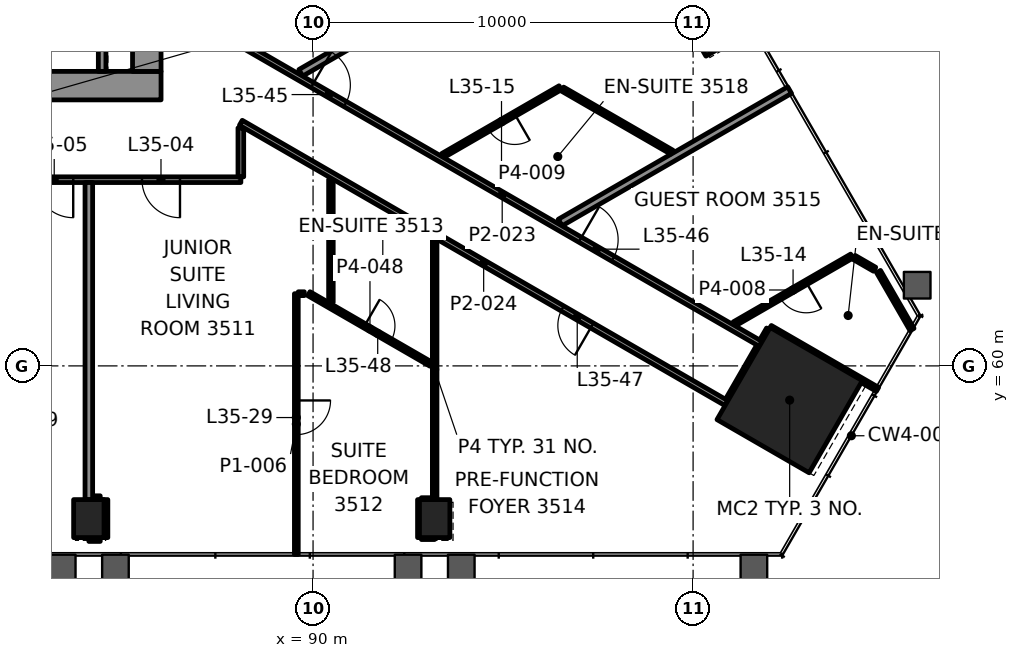
"""IFC4 building model, lengths in metres.
Left out: names, types, materials, properties, quantities, classifications, styles, units other than length and angle.
Written with IfcOpenShell. Run it as: python <this file> out.ifc"""

import sys

from ifc_helpers import new_model, si_unit, direction, frame, frame_2d, origin, origin_2d, place, context, subcontext, project, spatial, rectangle, hollow_rectangle, extrude, element, fill, save


model = new_model("IFC4")
c1 = context("Model", 3, precision=1e-05, world=origin(), true_north=direction((0.0, 1.0)))
c2 = subcontext(c1, "Body", "Model", "MODEL_VIEW")
j1 = project(units=[si_unit("LENGTHUNIT", "METRE"), si_unit("PLANEANGLEUNIT", "RADIAN")], contexts=[c1])
p1 = place(None, origin())
s1 = spatial("IfcSite", under=j1, at=p1, CompositionType="ELEMENT")
p2 = place(p1, origin())
s2 = spatial("IfcBuilding", under=s1, at=p2, CompositionType="ELEMENT")
p3 = place(p2, frame((0.0, 0.0, 155.8)))
s3 = spatial("IfcBuildingStorey", under=s2, at=p3, CompositionType="ELEMENT", Elevation=155.8)
p4 = place(p3, frame((102.541, 59.099, 0.0), z_axis=(0.0, 0.0, 1.0), x_axis=(0.5, 0.866025403784, 0.0)))
e1 = element("IfcColumn", 1, at=p4, inside=s3, PredefinedType="COLUMN", context=c2, shape_type="SweptSolid", body=[
    extrude(rectangle(XDim=2.8, YDim=2.8, at=origin_2d()), origin(), (0.0, 0.0, 1.0), 3.9),
])
for number, where, z_axis, x_axis in (
    (2, (84.1, 55.981, -0.0), (0.0, 0.0, 1.0), (1.0, 0.0, 0.0)),
    (3, (93.2, 55.981, -0.0), (0.0, 0.0, 1.0), (1.0, 0.0, 0.0)),
    (4, (100.571, 68.748, -0.0), (0.0, 0.0, 1.0), (-0.5, 0.866, 0.0)),
):
    element("IfcColumn", number, at=place(p3, frame(where, z_axis=z_axis, x_axis=x_axis)), inside=s3, PredefinedType="COLUMN", context=c2, shape_type="SweptSolid", body=[
        extrude(hollow_rectangle(XDim=0.8, YDim=1.0, WallThickness=0.05, at=origin_2d()), origin(), (0.0, 0.0, 1.0), 3.9),
    ])
p5 = place(p3, frame((64.0, 67.375, 0.0), z_axis=(0.0, 0.0, 1.0), x_axis=(1.0, 0.0, 0.0)))
e5 = element("IfcWall", 5, at=p5, inside=s3, PredefinedType="SHEAR", context=c2, shape_type="SweptSolid", body=[
    extrude(rectangle(XDim=22.0, YDim=0.75, at=frame_2d((11.0, 0.0))), origin(), (0.0, 0.0, 1.0), 3.7),
])
p6 = place(p5, frame((3.15, 0.0, 0.0)))
e6 = element("IfcOpeningElement", 6, at=p6, cuts=e5, PredefinedType="OPENING", context=c2, shape_type="SweptSolid", body=[
    extrude(rectangle(XDim=0.9, YDim=2.1, at=frame_2d((0.45, 1.05))), frame((0.0, 0.385, 0.0), z_axis=(0.0, -1.0, 0.0), x_axis=(1.0, 0.0, 0.0)), (0.0, 0.0, 1.0), 0.77),
])
p7 = place(p3, frame((85.625, 67.75, 0.0), z_axis=(0.0, 0.0, 1.0), x_axis=(0.0, 1.0, 0.0)))
e7 = element("IfcWall", 7, at=p7, inside=s3, PredefinedType="SHEAR", context=c2, shape_type="SweptSolid", body=[
    extrude(rectangle(XDim=14.5, YDim=0.75, at=frame_2d((7.25, 0.0))), origin(), (0.0, 0.0, 1.0), 3.7),
])
p8 = place(p7, frame((4.65, 0.0, 0.0)))
e8 = element("IfcOpeningElement", 8, at=p8, cuts=e7, PredefinedType="OPENING", context=c2, shape_type="SweptSolid", body=[
    extrude(rectangle(XDim=1.8, YDim=2.1, at=frame_2d((0.9, 1.05))), frame((0.0, 0.385, 0.0), z_axis=(0.0, -1.0, 0.0), x_axis=(1.0, 0.0, 0.0)), (0.0, 0.0, 1.0), 0.77),
])
p9 = place(p7, frame((11.8, 0.0, 0.0)))
e9 = element("IfcOpeningElement", 9, at=p9, cuts=e7, PredefinedType="OPENING", context=c2, shape_type="SweptSolid", body=[
    extrude(rectangle(XDim=0.9, YDim=2.1, at=frame_2d((0.45, 1.05))), frame((0.0, 0.385, 0.0), z_axis=(0.0, -1.0, 0.0), x_axis=(1.0, 0.0, 0.0)), (0.0, 0.0, 1.0), 0.77),
])
p10 = place(p3, frame((84.1, 55.481, 0.0), z_axis=(0.0, 0.0, 1.0), x_axis=(1.0, 0.0, 0.0)))
e10 = element("IfcWall", 10, at=p10, inside=s3, PredefinedType="PARTITIONING", context=c2, shape_type="SweptSolid", body=[
    extrude(rectangle(XDim=0.3, YDim=0.2, at=frame_2d((0.15, 0.0))), origin(), (0.0, 0.0, 1.0), 3.1),
])
p11 = place(p3, frame((92.851, 55.481, 0.0), z_axis=(0.0, 0.0, 1.0), x_axis=(1.0, 0.0, 0.0)))
e11 = element("IfcWall", 11, at=p11, inside=s3, PredefinedType="PARTITIONING", context=c2, shape_type="SweptSolid", body=[
    extrude(rectangle(XDim=0.349, YDim=0.1, at=frame_2d((0.174, 0.0))), origin(), (0.0, 0.0, 1.0), 3.1),
])
p12 = place(p3, frame((84.2, 56.481, 0.0), z_axis=(0.0, 0.0, 1.0), x_axis=(1.0, 0.0, 0.0)))
e12 = element("IfcWall", 12, at=p12, inside=s3, PredefinedType="PARTITIONING", context=c2, shape_type="SweptSolid", body=[
    extrude(rectangle(XDim=0.2, YDim=0.2, at=frame_2d((0.1, 0.0))), origin(), (0.0, 0.0, 1.0), 3.1),
])
p13 = place(p3, frame((92.851, 56.481, 0.0), z_axis=(0.0, 0.0, 1.0), x_axis=(1.0, 0.0, 0.0)))
e13 = element("IfcWall", 13, at=p13, inside=s3, PredefinedType="PARTITIONING", context=c2, shape_type="SweptSolid", body=[
    extrude(rectangle(XDim=0.289, YDim=0.1, at=frame_2d((0.145, 0.0))), origin(), (0.0, 0.0, 1.0), 3.1),
])
p14 = place(p3, frame((89.61, 61.9, 0.0), z_axis=(0.0, 0.0, 1.0), x_axis=(1.0, 0.0, 0.0)))
e14 = element("IfcWall", 14, at=p14, inside=s3, PredefinedType="PARTITIONING", context=c2, shape_type="SweptSolid", body=[
    extrude(rectangle(XDim=0.16, YDim=0.1, at=frame_2d((0.08, 0.0))), origin(), (0.0, 0.0, 1.0), 3.1),
])
p15 = place(p3, frame((88.1, 64.9, 0.0), z_axis=(0.0, 0.0, 1.0), x_axis=(-1.0, 0.0, 0.0)))
e15 = element("IfcWall", 15, at=p15, inside=s3, PredefinedType="PARTITIONING", context=c2, shape_type="SweptSolid", body=[
    extrude(rectangle(XDim=26.2, YDim=0.15, at=frame_2d((13.1, 0.0))), origin(), (0.0, 0.0, 1.0), 3.1),
])
p16 = place(p15, frame((1.602, 0.0, 0.0)))
e16 = element("IfcOpeningElement", 16, at=p16, cuts=e15, PredefinedType="OPENING", context=c2, shape_type="SweptSolid", body=[
    extrude(rectangle(XDim=1.0, YDim=2.1, at=frame_2d((0.5, 1.05))), frame((0.0, 0.085, 0.0), z_axis=(0.0, -1.0, 0.0), x_axis=(1.0, 0.0, 0.0)), (0.0, 0.0, 1.0), 0.17),
])
p17 = place(p15, frame((4.411, 0.0, 0.0)))
e17 = element("IfcOpeningElement", 17, at=p17, cuts=e15, PredefinedType="OPENING", context=c2, shape_type="SweptSolid", body=[
    extrude(rectangle(XDim=1.0, YDim=2.1, at=frame_2d((0.5, 1.05))), frame((0.0, 0.085, 0.0), z_axis=(0.0, -1.0, 0.0), x_axis=(1.0, 0.0, 0.0)), (0.0, 0.0, 1.0), 0.17),
])
p18 = place(p15, frame((12.081, 0.0, 0.0)))
e18 = element("IfcOpeningElement", 18, at=p18, cuts=e15, PredefinedType="OPENING", context=c2, shape_type="SweptSolid", body=[
    extrude(rectangle(XDim=0.9, YDim=2.1, at=frame_2d((0.45, 1.05))), frame((0.0, 0.085, 0.0), z_axis=(0.0, -1.0, 0.0), x_axis=(1.0, 0.0, 0.0)), (0.0, 0.0, 1.0), 0.17),
])
p19 = place(p15, frame((15.494, 0.0, 0.0)))
e19 = element("IfcOpeningElement", 19, at=p19, cuts=e15, PredefinedType="OPENING", context=c2, shape_type="SweptSolid", body=[
    extrude(rectangle(XDim=0.9, YDim=2.1, at=frame_2d((0.45, 1.05))), frame((0.0, 0.085, 0.0), z_axis=(0.0, -1.0, 0.0), x_axis=(1.0, 0.0, 0.0)), (0.0, 0.0, 1.0), 0.17),
])
p20 = place(p15, frame((17.873, 0.0, 0.0)))
e20 = element("IfcOpeningElement", 20, at=p20, cuts=e15, PredefinedType="OPENING", context=c2, shape_type="SweptSolid", body=[
    extrude(rectangle(XDim=1.0, YDim=2.1, at=frame_2d((0.5, 1.05))), frame((0.0, 0.085, 0.0), z_axis=(0.0, -1.0, 0.0), x_axis=(1.0, 0.0, 0.0)), (0.0, 0.0, 1.0), 0.17),
])
p21 = place(p15, frame((22.423, 0.0, 0.0)))
e21 = element("IfcOpeningElement", 21, at=p21, cuts=e15, PredefinedType="OPENING", context=c2, shape_type="SweptSolid", body=[
    extrude(rectangle(XDim=1.0, YDim=2.1, at=frame_2d((0.5, 1.05))), frame((0.0, 0.085, 0.0), z_axis=(0.0, -1.0, 0.0), x_axis=(1.0, 0.0, 0.0)), (0.0, 0.0, 1.0), 0.17),
])
p22 = place(p3, frame((104.176, 62.89, 0.0), z_axis=(0.0, 0.0, 1.0), x_axis=(-0.865998731726, -0.500046194516, 0.0)))
e22 = element("IfcWall", 22, at=p22, inside=s3, PredefinedType="PARTITIONING", context=c2, shape_type="SweptSolid", body=[
    extrude(rectangle(XDim=3.569, YDim=0.12, at=frame_2d((1.784, 0.0))), origin(), (0.0, 0.0, 1.0), 3.1),
])
p23 = place(p22, frame((1.384, 0.0, 0.0)))
e23 = element("IfcOpeningElement", 23, at=p23, cuts=e22, PredefinedType="OPENING", context=c2, shape_type="SweptSolid", body=[
    extrude(rectangle(XDim=0.8, YDim=2.1, at=frame_2d((0.4, 1.05))), frame((0.0, 0.07, 0.0), z_axis=(0.0, -1.0, 0.0), x_axis=(1.0, 0.0, 0.0)), (0.0, 0.0, 1.0), 0.14),
])
p24 = place(p3, frame((96.502, 63.772, 0.0), z_axis=(0.0, 0.0, 1.0), x_axis=(0.866014709899, 0.500018521895, 0.0)))
e24 = element("IfcWall", 24, at=p24, inside=s3, PredefinedType="PARTITIONING", context=c2, shape_type="SweptSolid", body=[
    extrude(rectangle(XDim=6.971, YDim=0.2, at=frame_2d((3.486, 0.0))), origin(), (0.0, 0.0, 1.0), 3.1),
])
p25 = place(p3, frame((96.504, 67.319, 0.0), z_axis=(0.0, 0.0, 1.0), x_axis=(-0.866028357664, -0.499994883695, 0.0)))
e25 = element("IfcWall", 25, at=p25, inside=s3, PredefinedType="PARTITIONING", context=c2, shape_type="SweptSolid", body=[
    extrude(rectangle(XDim=3.568, YDim=0.12, at=frame_2d((1.784, 0.0))), origin(), (0.0, 0.0, 1.0), 3.1),
])
p26 = place(p25, frame((1.384, 0.0, 0.0)))
e26 = element("IfcOpeningElement", 26, at=p26, cuts=e25, PredefinedType="OPENING", context=c2, shape_type="SweptSolid", body=[
    extrude(rectangle(XDim=0.8, YDim=2.1, at=frame_2d((0.4, 1.05))), frame((0.0, 0.07, 0.0), z_axis=(0.0, -1.0, 0.0), x_axis=(1.0, 0.0, 0.0)), (0.0, 0.0, 1.0), 0.14),
])
p27 = place(p3, frame((89.677, 67.712, 0.0), z_axis=(0.0, 0.0, 1.0), x_axis=(0.866020529357, 0.500008442661, 0.0)))
e27 = element("IfcWall", 27, at=p27, inside=s3, PredefinedType="PARTITIONING", context=c2, shape_type="SweptSolid", body=[
    extrude(rectangle(XDim=10.912, YDim=0.2, at=frame_2d((5.456, 0.0))), origin(), (0.0, 0.0, 1.0), 2.865),
])
p28 = place(p3, frame((100.917, 59.085, 0.0), z_axis=(0.0, 0.0, 1.0), x_axis=(0.499991515992, 0.866030301974, 0.0)))
e28 = element("IfcWall", 28, at=p28, inside=s3, PredefinedType="PARTITIONING", context=c2, shape_type="SweptSolid", body=[
    extrude(rectangle(XDim=1.649, YDim=0.15, at=frame_2d((0.825, 0.0))), origin(), (0.0, 0.0, 1.0), 2.947),
])
p29 = place(p3, frame((93.2, 56.482, 0.0), z_axis=(0.0, 0.0, 1.0), x_axis=(0.0, 1.0, 0.0)))
e29 = element("IfcWall", 29, at=p29, inside=s3, PredefinedType="PARTITIONING", context=c2, shape_type="SweptSolid", body=[
    extrude(rectangle(XDim=6.844, YDim=0.12, at=frame_2d((3.422, 0.0))), origin(), (0.0, 0.0, 1.0), 3.1),
])
p30 = place(p3, frame((92.8, 55.482, 0.0), z_axis=(0.0, 0.0, 1.0), x_axis=(0.0, 1.0, 0.0)))
e30 = element("IfcWall", 30, at=p30, inside=s3, PredefinedType="PARTITIONING", context=c2, shape_type="SweptSolid", body=[
    extrude(rectangle(XDim=0.999, YDim=0.1, at=frame_2d((0.5, 0.0))), origin(), (0.0, 0.0, 1.0), 2.865),
])
p31 = place(p3, frame((90.47, 61.674, 0.0), z_axis=(0.0, 0.0, 1.0), x_axis=(0.0, 1.0, 0.0)))
e31 = element("IfcWall", 31, at=p31, inside=s3, PredefinedType="PARTITIONING", context=c2, shape_type="SweptSolid", body=[
    extrude(rectangle(XDim=3.228, YDim=0.12, at=frame_2d((1.614, 0.0))), origin(), (0.0, 0.0, 1.0), 2.947),
])
p32 = place(p3, frame((89.56, 61.9, 0.0), z_axis=(0.0, 0.0, 1.0), x_axis=(0.0, -1.0, 0.0)))
e32 = element("IfcWall", 32, at=p32, inside=s3, PredefinedType="PARTITIONING", context=c2, shape_type="SweptSolid", body=[
    extrude(rectangle(XDim=6.862, YDim=0.1, at=frame_2d((3.431, 0.0))), origin(), (0.0, 0.0, 1.0), 2.865),
])
p33 = place(p32, frame((2.809, 0.0, 0.0)))
e33 = element("IfcOpeningElement", 33, at=p33, cuts=e32, PredefinedType="OPENING", context=c2, shape_type="SweptSolid", body=[
    extrude(rectangle(XDim=0.9, YDim=2.1, at=frame_2d((0.45, 1.05))), frame((0.0, 0.06, 0.0), z_axis=(0.0, -1.0, 0.0), x_axis=(1.0, 0.0, 0.0)), (0.0, 0.0, 1.0), 0.12),
])
p34 = place(p3, frame((88.1, 64.975, 0.0), z_axis=(0.0, 0.0, 1.0), x_axis=(0.0, 1.0, 0.0)))
e34 = element("IfcWall", 34, at=p34, inside=s3, PredefinedType="PARTITIONING", context=c2, shape_type="SweptSolid", body=[
    extrude(rectangle(XDim=1.286, YDim=0.15, at=frame_2d((0.643, 0.0))), origin(), (0.0, 0.0, 1.0), 2.947),
])
p35 = place(p3, frame((84.5, 55.481, 0.0), z_axis=(0.0, 0.0, 1.0), x_axis=(0.0, 1.0, 0.0)))
e35 = element("IfcWall", 35, at=p35, inside=s3, PredefinedType="PARTITIONING", context=c2, shape_type="SweptSolid", body=[
    extrude(rectangle(XDim=1.0, YDim=0.2, at=frame_2d((0.5, 0.0))), origin(), (0.0, 0.0, 1.0), 2.865),
])
p36 = place(p3, frame((84.1, 56.481, 0.0), z_axis=(0.0, 0.0, 1.0), x_axis=(0.0, 1.0, 0.0)))
e36 = element("IfcWall", 36, at=p36, inside=s3, PredefinedType="PARTITIONING", context=c2, shape_type="SweptSolid", body=[
    extrude(rectangle(XDim=8.344, YDim=0.2, at=frame_2d((4.172, 0.0))), origin(), (0.0, 0.0, 1.0), 3.1),
])
p37 = place(p3, frame((105.761, 60.956, 0.0), z_axis=(0.0, 0.0, 1.0), x_axis=(-0.500042189638, 0.866001044215, 0.0)))
e37 = element("IfcWall", 37, at=p37, inside=s3, PredefinedType="PARTITIONING", context=c2, shape_type="SweptSolid", body=[
    extrude(rectangle(XDim=1.762, YDim=0.12, at=frame_2d((0.881, 0.0))), origin(), (0.0, 0.0, 1.0), 3.1),
])
p38 = place(p3, frame((104.777, 62.543, 0.0), z_axis=(0.0, 0.0, 1.0), x_axis=(-0.866166054807, 0.499756306114, 0.0)))
e38 = element("IfcWall", 38, at=p38, inside=s3, PredefinedType="PARTITIONING", context=c2, shape_type="SweptSolid", body=[
    extrude(rectangle(XDim=0.624, YDim=0.12, at=frame_2d((0.312, 0.0))), origin(), (0.0, 0.0, 1.0), 3.1),
])
p39 = place(p3, frame((99.44, 65.624, 0.0), z_axis=(0.0, 0.0, 1.0), x_axis=(-0.866054626172, 0.499949381925, 0.0)))
e39 = element("IfcWall", 39, at=p39, inside=s3, PredefinedType="PARTITIONING", context=c2, shape_type="SweptSolid", body=[
    extrude(rectangle(XDim=3.322, YDim=0.12, at=frame_2d((1.661, 0.0))), origin(), (0.0, 0.0, 1.0), 3.1),
])
p40 = place(p3, frame((104.852, 59.382, 0.0), z_axis=(0.0, 0.0, 1.0), x_axis=(-0.866003472149, 0.500037984783, 0.0)))
e40 = element("IfcWall", 40, at=p40, inside=s3, PredefinedType="PARTITIONING", context=c2, shape_type="SweptSolid", body=[
    extrude(rectangle(XDim=3.26, YDim=0.12, at=frame_2d((1.63, 0.0))), origin(), (0.0, 0.0, 1.0), 3.1),
])
p41 = place(p3, frame((88.175, 68.433, 0.0), z_axis=(0.0, 0.0, 1.0), x_axis=(0.866028999927, -0.499993771247, 0.0)))
e41 = element("IfcWall", 41, at=p41, inside=s3, PredefinedType="PARTITIONING", context=c2, shape_type="SweptSolid", body=[
    extrude(rectangle(XDim=15.708, YDim=0.15, at=frame_2d((7.854, 0.0))), origin(), (0.0, 0.0, 1.0), 3.1),
])
p42 = place(p41, frame((2.086, 0.0, 0.0)))
e42 = element("IfcOpeningElement", 42, at=p42, cuts=e41, PredefinedType="OPENING", context=c2, shape_type="SweptSolid", body=[
    extrude(rectangle(XDim=1.0, YDim=2.1, at=frame_2d((0.5, 1.05))), frame((0.0, 0.085, 0.0), z_axis=(0.0, -1.0, 0.0), x_axis=(1.0, 0.0, 0.0)), (0.0, 0.0, 1.0), 0.17),
])
p43 = place(p41, frame((10.222, 0.0, 0.0)))
e43 = element("IfcOpeningElement", 43, at=p43, cuts=e41, PredefinedType="OPENING", context=c2, shape_type="SweptSolid", body=[
    extrude(rectangle(XDim=1.0, YDim=2.1, at=frame_2d((0.5, 1.05))), frame((0.0, 0.085, 0.0), z_axis=(0.0, -1.0, 0.0), x_axis=(1.0, 0.0, 0.0)), (0.0, 0.0, 1.0), 0.17),
])
p44 = place(p3, frame((100.878, 59.02, 0.0), z_axis=(0.0, 0.0, 1.0), x_axis=(-0.866029079904, 0.49999363272, 0.0)))
e44 = element("IfcWall", 44, at=p44, inside=s3, PredefinedType="PARTITIONING", context=c2, shape_type="SweptSolid", body=[
    extrude(rectangle(XDim=14.755, YDim=0.15, at=frame_2d((7.377, 0.0))), origin(), (0.0, 0.0, 1.0), 2.947),
])
p45 = place(p44, frame((4.084, 0.0, 0.0)))
e45 = element("IfcOpeningElement", 45, at=p45, cuts=e44, PredefinedType="OPENING", context=c2, shape_type="SweptSolid", body=[
    extrude(rectangle(XDim=0.9, YDim=2.1, at=frame_2d((0.45, 1.05))), frame((0.0, 0.085, 0.0), z_axis=(0.0, -1.0, 0.0), x_axis=(1.0, 0.0, 0.0)), (0.0, 0.0, 1.0), 0.17),
])
p46 = place(p3, frame((89.89, 61.9, 0.0), z_axis=(0.0, 0.0, 1.0), x_axis=(0.866033387068, -0.499986172292, 0.0)))
e46 = element("IfcWall", 46, at=p46, inside=s3, PredefinedType="PARTITIONING", context=c2, shape_type="SweptSolid", body=[
    extrude(rectangle(XDim=3.713, YDim=0.12, at=frame_2d((1.856, 0.0))), origin(), (0.0, 0.0, 1.0), 3.1),
])
p47 = place(p46, frame((1.691, 0.0, 0.0)))
e47 = element("IfcOpeningElement", 47, at=p47, cuts=e46, PredefinedType="OPENING", context=c2, shape_type="SweptSolid", body=[
    extrude(rectangle(XDim=0.8, YDim=2.1, at=frame_2d((0.4, 1.05))), frame((0.0, 0.07, 0.0), z_axis=(0.0, -1.0, 0.0), x_axis=(1.0, 0.0, 0.0)), (0.0, 0.0, 1.0), 0.14),
])
p48 = place(p3, frame((101.817, 60.643, 0.0), z_axis=(0.0, 0.0, 1.0), x_axis=(0.499741784413, 0.866174433305, 0.0)))
e48 = element("IfcWall", 48, at=p48, inside=s3, PredefinedType="PARTITIONING", context=c2, shape_type="SweptSolid", body=[
    extrude(rectangle(XDim=0.365, YDim=0.15, at=frame_2d((0.182, 0.0))), origin(), (0.0, 0.0, 1.0), 3.1),
])
p49 = place(p3, frame((84.45, 67.75, 0.0), z_axis=(0.0, 0.0, 1.0), x_axis=(0.0, 1.0, 0.0)))
e49 = element("IfcWall", 49, at=p49, inside=s3, PredefinedType="PARTITIONING", context=c2, shape_type="SweptSolid", body=[
    extrude(rectangle(XDim=0.95, YDim=0.2, at=frame_2d((0.475, 0.0))), origin(), (0.0, 0.0, 1.0), 3.7),
])
p50 = place(p16, origin())
e50 = element("IfcDoor", 50, at=p50, inside=s3, OperationType="SINGLE_SWING_LEFT", PredefinedType="DOOR", context=c2, shape_type="SweptSolid", body=[
    extrude(rectangle(XDim=1.0, YDim=2.1, at=frame_2d((0.5, 1.05))), frame((0.0, 0.025, 0.0), z_axis=(0.0, -1.0, 0.0), x_axis=(1.0, 0.0, 0.0)), (0.0, 0.0, 1.0), 0.05),
])
fill(e16, e50)
p51 = place(p17, origin())
e51 = element("IfcDoor", 51, at=p51, inside=s3, OperationType="SINGLE_SWING_LEFT", PredefinedType="DOOR", context=c2, shape_type="SweptSolid", body=[
    extrude(rectangle(XDim=1.0, YDim=2.1, at=frame_2d((0.5, 1.05))), frame((0.0, 0.025, 0.0), z_axis=(0.0, -1.0, 0.0), x_axis=(1.0, 0.0, 0.0)), (0.0, 0.0, 1.0), 0.05),
])
fill(e17, e51)
p52 = place(p23, origin())
e52 = element("IfcDoor", 52, at=p52, inside=s3, OperationType="SINGLE_SWING_RIGHT", PredefinedType="DOOR", context=c2, shape_type="SweptSolid", body=[
    extrude(rectangle(XDim=0.8, YDim=2.1, at=frame_2d((0.4, 1.05))), frame((0.0, 0.025, 0.0), z_axis=(0.0, -1.0, 0.0), x_axis=(1.0, 0.0, 0.0)), (0.0, 0.0, 1.0), 0.05),
])
fill(e23, e52)
p53 = place(p26, origin())
e53 = element("IfcDoor", 53, at=p53, inside=s3, OperationType="SINGLE_SWING_RIGHT", PredefinedType="DOOR", context=c2, shape_type="SweptSolid", body=[
    extrude(rectangle(XDim=0.8, YDim=2.1, at=frame_2d((0.4, 1.05))), frame((0.0, 0.025, 0.0), z_axis=(0.0, -1.0, 0.0), x_axis=(1.0, 0.0, 0.0)), (0.0, 0.0, 1.0), 0.05),
])
fill(e26, e53)
p54 = place(p33, origin())
e54 = element("IfcDoor", 54, at=p54, inside=s3, OperationType="SINGLE_SWING_RIGHT", PredefinedType="DOOR", context=c2, shape_type="SweptSolid", body=[
    extrude(rectangle(XDim=0.9, YDim=2.1, at=frame_2d((0.45, 1.05))), frame((0.0, 0.025, 0.0), z_axis=(0.0, -1.0, 0.0), x_axis=(1.0, 0.0, 0.0)), (0.0, 0.0, 1.0), 0.05),
])
fill(e33, e54)
p55 = place(p42, origin())
e55 = element("IfcDoor", 55, at=p55, inside=s3, OperationType="SINGLE_SWING_LEFT", PredefinedType="DOOR", context=c2, shape_type="SweptSolid", body=[
    extrude(rectangle(XDim=1.0, YDim=2.1, at=frame_2d((0.5, 1.05))), frame((0.0, 0.025, 0.0), z_axis=(0.0, -1.0, 0.0), x_axis=(1.0, 0.0, 0.0)), (0.0, 0.0, 1.0), 0.05),
])
fill(e42, e55)
p56 = place(p43, origin())
e56 = element("IfcDoor", 56, at=p56, inside=s3, OperationType="SINGLE_SWING_LEFT", PredefinedType="DOOR", context=c2, shape_type="SweptSolid", body=[
    extrude(rectangle(XDim=1.0, YDim=2.1, at=frame_2d((0.5, 1.05))), frame((0.0, 0.025, 0.0), z_axis=(0.0, -1.0, 0.0), x_axis=(1.0, 0.0, 0.0)), (0.0, 0.0, 1.0), 0.05),
])
fill(e43, e56)
p57 = place(p45, origin())
e57 = element("IfcDoor", 57, at=p57, inside=s3, OperationType="SINGLE_SWING_LEFT", PredefinedType="DOOR", context=c2, shape_type="SweptSolid", body=[
    extrude(rectangle(XDim=0.9, YDim=2.1, at=frame_2d((0.45, 1.05))), frame((0.0, 0.025, 0.0), z_axis=(0.0, -1.0, 0.0), x_axis=(1.0, 0.0, 0.0)), (0.0, 0.0, 1.0), 0.05),
])
fill(e45, e57)
p58 = place(p47, origin())
e58 = element("IfcDoor", 58, at=p58, inside=s3, OperationType="SINGLE_SWING_LEFT", PredefinedType="DOOR", context=c2, shape_type="SweptSolid", body=[
    extrude(rectangle(XDim=0.8, YDim=2.1, at=frame_2d((0.4, 1.05))), frame((0.0, 0.025, 0.0), z_axis=(0.0, -1.0, 0.0), x_axis=(1.0, 0.0, 0.0)), (0.0, 0.0, 1.0), 0.05),
])
fill(e47, e58)
p59 = place(p3, origin())
p60 = place(p59, frame((87.193, 55.006, 0.15), z_axis=(0.0, 0.0, 1.0), x_axis=(1.0, 0.0, 0.0)))
p61 = place(p60, origin())
e59 = element("IfcWindow", 59, at=p61, inside=s3, PartitioningType="SINGLE_PANEL", PredefinedType="WINDOW", context=c2, shape_type="SweptSolid", body=[
    extrude(rectangle(XDim=2.958, YDim=3.55, at=frame_2d((1.479, 1.775))), frame((0.0, 0.03, 0.0), z_axis=(0.0, -1.0, 0.0), x_axis=(1.0, 0.0, 0.0)), (0.0, 0.0, 1.0), 0.06),
])
p62 = place(p59, frame((104.448, 63.983, 0.15), z_axis=(0.0, 0.0, 1.0), x_axis=(-0.5, 0.866025, 0.0)))
p63 = place(p62, origin())
e60 = element("IfcWindow", 60, at=p63, inside=s3, PartitioningType="SINGLE_PANEL", PredefinedType="WINDOW", context=c2, shape_type="SweptSolid", body=[
    extrude(rectangle(XDim=2.958, YDim=3.55, at=frame_2d((1.479, 1.775))), frame((0.0, 0.03, 0.0), z_axis=(0.0, -1.0, 0.0), x_axis=(1.0, 0.0, 0.0)), (0.0, 0.0, 1.0), 0.06),
])
save(model, sys.argv[1])
